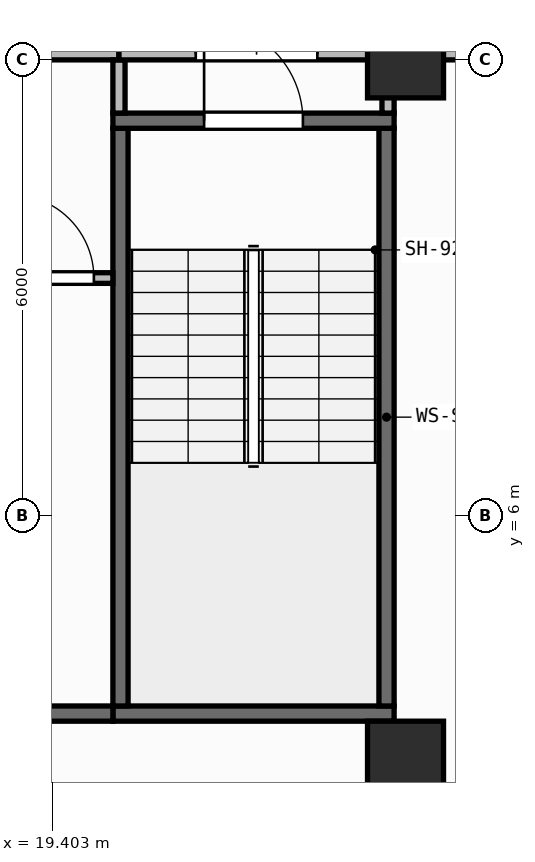
"""IFC4 building model, lengths in metres.
Left out: names, types, materials, properties, quantities, classifications, styles, units other than length and angle.
Written with IfcOpenShell. Run it as: python <this file> out.ifc"""

import sys

from ifc_helpers import new_model, si_unit, direction, frame, frame_2d, origin, origin_2d, place, context, subcontext, project, spatial, rectangle, extrude, element, fill, save


model = new_model("IFC4")
c1 = context("Model", 3, precision=1e-05, world=origin(), true_north=direction((0.0, 1.0)))
c2 = subcontext(c1, "Body", "Model", "MODEL_VIEW")
j1 = project(units=[si_unit("LENGTHUNIT", "METRE"), si_unit("PLANEANGLEUNIT", "RADIAN")], contexts=[c1])
p1 = place(None, origin())
s1 = spatial("IfcSite", under=j1, at=p1, CompositionType="ELEMENT")
p2 = place(p1, origin())
s2 = spatial("IfcBuilding", under=s1, at=p2, CompositionType="ELEMENT")
p3 = place(p2, frame((0.0, 0.0, 227.65)))
s3 = spatial("IfcBuildingStorey", under=s2, at=p3, CompositionType="ELEMENT", Elevation=227.65)
for number, where, z_axis, x_axis in (
    (1, (24.05, 2.8, 0.0), (0.0, 0.0, 1.0), (1.0, 0.0, 0.0)),
    (2, (24.05, 12.0, 0.0), (0.0, 0.0, 1.0), (1.0, 0.0, 0.0)),
):
    element("IfcColumn", number, at=place(p3, frame(where, z_axis=z_axis, x_axis=x_axis)), inside=s3, PredefinedType="COLUMN", context=c2, shape_type="SweptSolid", body=[
        extrude(rectangle(XDim=1.0, YDim=1.0, at=origin_2d()), origin(), (0.0, 0.0, 1.0), 3.95),
    ])
p4 = place(p3, frame((2.66, 0.174, 0.0), z_axis=(0.0, 0.0, 1.0), x_axis=(0.996634028439, 0.081979347142, 0.0)))
e3 = element("IfcWall", 3, at=p4, inside=s3, PredefinedType="STANDARD", context=c2, shape_type="SweptSolid", body=[
    extrude(rectangle(XDim=46.035, YDim=0.26, at=frame_2d((23.018, 0.0))), origin(), (0.0, 0.0, 1.0), 3.71),
])
p5 = place(p4, frame((21.817, 0.0, 0.9)))
e4 = element("IfcOpeningElement", 4, at=p5, cuts=e3, PredefinedType="OPENING", context=c2, shape_type="SweptSolid", body=[
    extrude(rectangle(XDim=2.4, YDim=1.65, at=frame_2d((1.2, 0.825))), frame((0.0, 0.14, 0.0), z_axis=(0.0, -1.0, 0.0), x_axis=(1.0, 0.0, 0.0)), (0.0, 0.0, 1.0), 0.28),
])
p6 = place(p3, frame((20.2, 3.4, 0.0), z_axis=(0.0, 0.0, 1.0), x_axis=(1.0, 0.0, 0.0)))
e5 = element("IfcWall", 5, at=p6, inside=s3, PredefinedType="SHEAR", context=c2, shape_type="SweptSolid", body=[
    extrude(rectangle(XDim=3.7, YDim=0.2, at=frame_2d((1.85, 0.0))), origin(), (0.0, 0.0, 1.0), 3.71),
])
for number, where, z_axis, x_axis in (
    (6, (20.3, 3.5, 0.0), (0.0, 0.0, 1.0), (0.0, 1.0, 0.0)),
    (7, (23.8, 3.5, 0.0), (0.0, 0.0, 1.0), (0.0, 1.0, 0.0)),
):
    element("IfcWall", number, at=place(p3, frame(where, z_axis=z_axis, x_axis=x_axis)), inside=s3, PredefinedType="SHEAR", context=c2, shape_type="SweptSolid", body=[
        extrude(rectangle(XDim=7.6, YDim=0.2, at=frame_2d((3.8, 0.0))), origin(), (0.0, 0.0, 1.0), 3.71),
    ])
p7 = place(p3, frame((20.2, 11.2, 0.0), z_axis=(0.0, 0.0, 1.0), x_axis=(1.0, 0.0, 0.0)))
e8 = element("IfcWall", 8, at=p7, inside=s3, PredefinedType="SHEAR", context=c2, shape_type="SweptSolid", body=[
    extrude(rectangle(XDim=3.7, YDim=0.2, at=frame_2d((1.85, 0.0))), origin(), (0.0, 0.0, 1.0), 3.71),
])
p8 = place(p7, frame((1.2, 0.0, 0.0)))
e9 = element("IfcOpeningElement", 9, at=p8, cuts=e8, PredefinedType="OPENING", context=c2, shape_type="SweptSolid", body=[
    extrude(rectangle(XDim=1.3, YDim=2.15, at=frame_2d((0.65, 1.075))), frame((0.0, 0.11, 0.0), z_axis=(0.0, -1.0, 0.0), x_axis=(1.0, 0.0, 0.0)), (0.0, 0.0, 1.0), 0.22),
])
p9 = place(p3, frame((6.5, 3.4, 0.0), z_axis=(0.0, 0.0, 1.0), x_axis=(1.0, 0.0, 0.0)))
e10 = element("IfcWall", 10, at=p9, inside=s3, PredefinedType="SHEAR", context=c2, shape_type="SweptSolid", body=[
    extrude(rectangle(XDim=13.7, YDim=0.2, at=frame_2d((6.85, 0.0))), origin(), (0.0, 0.0, 1.0), 3.71),
])
p10 = place(p3, frame((18.61, 9.13, 0.0), z_axis=(0.0, 0.0, 1.0), x_axis=(1.0, 0.0, 0.0)))
e11 = element("IfcWall", 11, at=p10, inside=s3, PredefinedType="PARTITIONING", context=c2, shape_type="SweptSolid", body=[
    extrude(rectangle(XDim=1.59, YDim=0.14, at=frame_2d((0.795, 0.0))), origin(), (0.0, 0.0, 1.0), 3.71),
])
p11 = place(p10, frame((0.24, 0.0, 0.0)))
e12 = element("IfcOpeningElement", 12, at=p11, cuts=e11, PredefinedType="OPENING", context=c2, shape_type="SweptSolid", body=[
    extrude(rectangle(XDim=1.1, YDim=2.1, at=frame_2d((0.55, 1.05))), frame((0.0, 0.08, 0.0), z_axis=(0.0, -1.0, 0.0), x_axis=(1.0, 0.0, 0.0)), (0.0, 0.0, 1.0), 0.16),
])
p12 = place(p3, frame((12.58, 12.08, 0.0), z_axis=(0.0, 0.0, 1.0), x_axis=(1.0, 0.0, 0.0)))
e13 = element("IfcWall", 13, at=p12, inside=s3, PredefinedType="PARTITIONING", context=c2, shape_type="SweptSolid", body=[
    extrude(rectangle(XDim=7.7, YDim=0.16, at=frame_2d((3.85, 0.0))), origin(), (0.0, 0.0, 1.0), 3.152),
])
p13 = place(p12, frame((3.05, 0.0, 0.0)))
e14 = element("IfcOpeningElement", 14, at=p13, cuts=e13, PredefinedType="OPENING", context=c2, shape_type="SweptSolid", body=[
    extrude(rectangle(XDim=1.6, YDim=2.05, at=frame_2d((0.8, 1.025))), frame((0.0, 0.09, 0.0), z_axis=(0.0, -1.0, 0.0), x_axis=(1.0, 0.0, 0.0)), (0.0, 0.0, 1.0), 0.18),
])
p14 = place(p3, frame((20.28, 11.3, 0.0), z_axis=(0.0, 0.0, 1.0), x_axis=(0.0, 1.0, 0.0)))
e15 = element("IfcWall", 15, at=p14, inside=s3, PredefinedType="PARTITIONING", context=c2, shape_type="SweptSolid", body=[
    extrude(rectangle(XDim=0.7, YDim=0.16, at=frame_2d((0.35, 0.0))), origin(), (0.0, 0.0, 1.0), 3.71),
])
p15 = place(p3, frame((20.28, 12.08, 0.0), z_axis=(0.0, 0.0, 1.0), x_axis=(1.0, 0.0, 0.0)))
e16 = element("IfcWall", 16, at=p15, inside=s3, PredefinedType="PARTITIONING", context=c2, shape_type="SweptSolid", body=[
    extrude(rectangle(XDim=3.62, YDim=0.16, at=frame_2d((1.81, 0.0))), origin(), (0.0, 0.0, 1.0), 3.152),
])
p16 = place(p15, frame((1.01, 0.0, 0.0)))
e17 = element("IfcOpeningElement", 17, at=p16, cuts=e16, PredefinedType="OPENING", context=c2, shape_type="SweptSolid", body=[
    extrude(rectangle(XDim=1.6, YDim=2.05, at=frame_2d((0.8, 1.025))), frame((0.0, 0.09, 0.0), z_axis=(0.0, -1.0, 0.0), x_axis=(1.0, 0.0, 0.0)), (0.0, 0.0, 1.0), 0.18),
])
p17 = place(p3, frame((23.82, 11.3, 0.0), z_axis=(0.0, 0.0, 1.0), x_axis=(0.0, 1.0, 0.0)))
e18 = element("IfcWall", 18, at=p17, inside=s3, PredefinedType="PARTITIONING", context=c2, shape_type="SweptSolid", body=[
    extrude(rectangle(XDim=0.7, YDim=0.16, at=frame_2d((0.35, 0.0))), origin(), (0.0, 0.0, 1.0), 3.71),
])
p18 = place(p3, frame((24.02, 12.08, 0.0), z_axis=(0.0, 0.0, 1.0), x_axis=(1.0, 0.0, 0.0)))
e19 = element("IfcWall", 19, at=p18, inside=s3, PredefinedType="PARTITIONING", context=c2, shape_type="SweptSolid", body=[
    extrude(rectangle(XDim=1.219, YDim=0.16, at=frame_2d((0.609, 0.0))), origin(), (0.0, 0.0, 1.0), 3.152),
])
p19 = place(p8, origin())
e20 = element("IfcDoor", 20, at=p19, inside=s3, OperationType="SINGLE_SWING_LEFT", PredefinedType="DOOR", context=c2, shape_type="SweptSolid", body=[
    extrude(rectangle(XDim=1.3, YDim=2.15, at=frame_2d((0.65, 1.075))), frame((0.0, 0.025, 0.0), z_axis=(0.0, -1.0, 0.0), x_axis=(1.0, 0.0, 0.0)), (0.0, 0.0, 1.0), 0.05),
])
fill(e9, e20)
p20 = place(p11, origin())
e21 = element("IfcDoor", 21, at=p20, inside=s3, OperationType="SINGLE_SWING_LEFT", PredefinedType="DOOR", context=c2, shape_type="SweptSolid", body=[
    extrude(rectangle(XDim=1.1, YDim=2.1, at=frame_2d((0.55, 1.05))), frame((0.0, 0.025, 0.0), z_axis=(0.0, -1.0, 0.0), x_axis=(1.0, 0.0, 0.0)), (0.0, 0.0, 1.0), 0.05),
])
fill(e12, e21)
p21 = place(p16, origin())
e22 = element("IfcDoor", 22, at=p21, inside=s3, OperationType="DOUBLE_DOOR_SINGLE_SWING", PredefinedType="DOOR", context=c2, shape_type="SweptSolid", body=[
    extrude(rectangle(XDim=1.6, YDim=2.05, at=frame_2d((0.8, 1.025))), frame((0.0, 0.025, 0.0), z_axis=(0.0, -1.0, 0.0), x_axis=(1.0, 0.0, 0.0)), (0.0, 0.0, 1.0), 0.05),
])
fill(e17, e22)
save(model, sys.argv[1])
